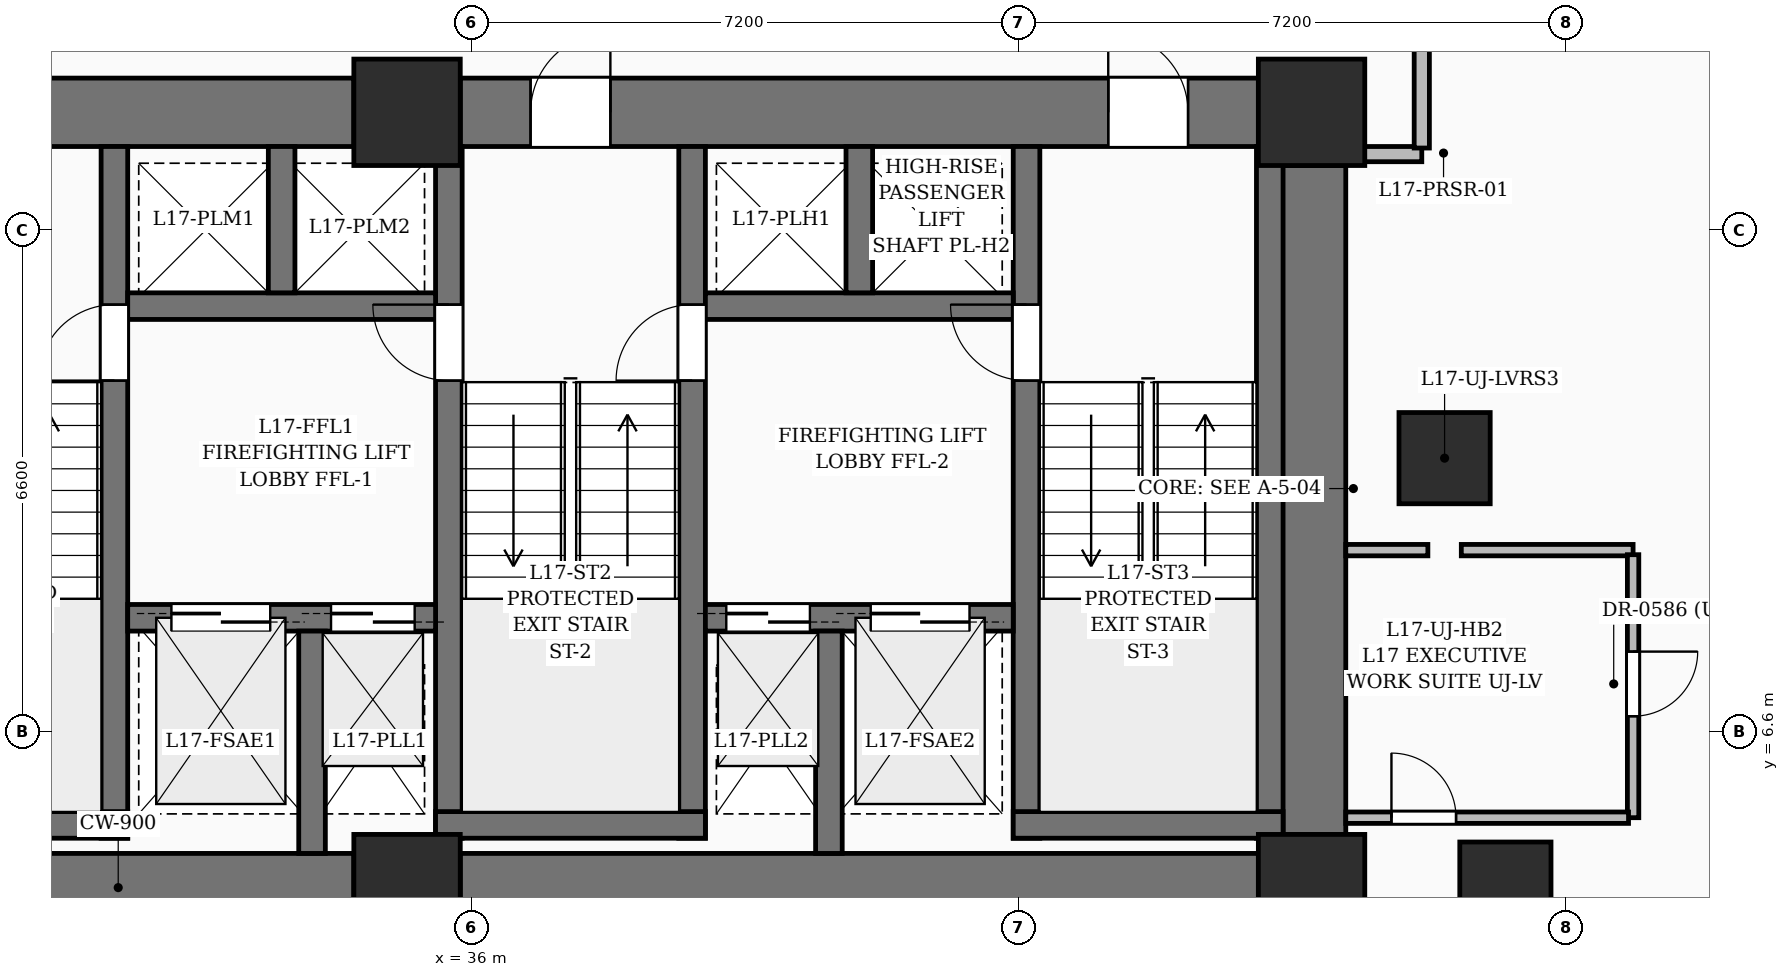
"""IFC4 building model, lengths in metres.
Left out: names, types, materials, properties, quantities, classifications, styles, units other than length and angle.
Written with IfcOpenShell. Run it as: python <this file> out.ifc"""

import sys

from ifc_helpers import new_model, si_unit, direction, frame, frame_2d, origin, origin_2d, place, context, subcontext, project, spatial, rectangle, extrude, element, fill, save


model = new_model("IFC4")
c1 = context("Model", 3, precision=1e-05, world=origin(), true_north=direction((0.0, 1.0)))
c2 = subcontext(c1, "Body", "Model", "MODEL_VIEW")
j1 = project(units=[si_unit("LENGTHUNIT", "METRE"), si_unit("PLANEANGLEUNIT", "RADIAN")], contexts=[c1])
p1 = place(None, origin())
s1 = spatial("IfcSite", under=j1, at=p1, CompositionType="ELEMENT")
p2 = place(p1, origin())
s2 = spatial("IfcBuilding", under=s1, at=p2, CompositionType="ELEMENT")
p3 = place(p2, frame((0.0, 0.0, 71.4)))
s3 = spatial("IfcBuildingStorey", under=s2, at=p3, CompositionType="ELEMENT", Elevation=71.4)
for number, where, z_axis, x_axis in (
    (1, (35.15, 4.55, 0.0), (0.0, 0.0, 1.0), (1.0, 0.0, 0.0)),
    (2, (47.05, 4.55, 0.0), (0.0, 0.0, 1.0), (1.0, 0.0, 0.0)),
    (3, (35.15, 14.75, 0.0), (0.0, 0.0, 1.0), (1.0, 0.0, 0.0)),
    (4, (47.05, 14.75, 0.0), (0.0, 0.0, 1.0), (1.0, 0.0, 0.0)),
):
    element("IfcColumn", number, at=place(p3, frame(where, z_axis=z_axis, x_axis=x_axis)), inside=s3, PredefinedType="COLUMN", context=c2, shape_type="SweptSolid", body=[
        extrude(rectangle(XDim=1.4, YDim=1.4, at=origin_2d()), origin(), (0.0, 0.0, 1.0), 3.6),
    ])
for number, where, z_axis, x_axis in (
    (5, (49.6, 4.55, 0.0), (0.0, 0.0, 1.0), (1.0, 0.0, 0.0)),
    (6, (48.8, 10.2, 0.0), (0.0, 0.0, 1.0), (1.0, 0.0, 0.0)),
):
    element("IfcColumn", number, at=place(p3, frame(where, z_axis=z_axis, x_axis=x_axis)), inside=s3, PredefinedType="COLUMN", context=c2, shape_type="SweptSolid", body=[
        extrude(rectangle(XDim=1.2, YDim=1.2, at=origin_2d()), origin(), (0.0, 0.0, 1.0), 3.6),
    ])
p4 = place(p3, frame((28.25, 4.55, 0.0), z_axis=(0.0, 0.0, 1.0), x_axis=(1.0, 0.0, 0.0)))
e7 = element("IfcWall", 7, at=p4, inside=s3, PredefinedType="SHEAR", context=c2, shape_type="SweptSolid", body=[
    extrude(rectangle(XDim=6.2, YDim=0.9, at=frame_2d((3.1, 0.0))), origin(), (0.0, 0.0, 1.0), 3.6),
])
p5 = place(p3, frame((35.85, 4.55, 0.0), z_axis=(0.0, 0.0, 1.0), x_axis=(1.0, 0.0, 0.0)))
e8 = element("IfcWall", 8, at=p5, inside=s3, PredefinedType="SHEAR", context=c2, shape_type="SweptSolid", body=[
    extrude(rectangle(XDim=10.5, YDim=0.9, at=frame_2d((5.25, 0.0))), origin(), (0.0, 0.0, 1.0), 3.6),
])
p6 = place(p3, frame((28.25, 14.75, 0.0), z_axis=(0.0, 0.0, 1.0), x_axis=(1.0, 0.0, 0.0)))
e9 = element("IfcWall", 9, at=p6, inside=s3, PredefinedType="SHEAR", context=c2, shape_type="SweptSolid", body=[
    extrude(rectangle(XDim=6.2, YDim=0.9, at=frame_2d((3.1, 0.0))), origin(), (0.0, 0.0, 1.0), 3.6),
])
p7 = place(p6, frame((0.925, 0.0, 0.0)))
e10 = element("IfcOpeningElement", 10, at=p7, cuts=e9, PredefinedType="OPENING", context=c2, shape_type="SweptSolid", body=[
    extrude(rectangle(XDim=1.05, YDim=2.15, at=frame_2d((0.525, 1.075))), frame((0.0, 0.46, 0.0), z_axis=(0.0, -1.0, 0.0), x_axis=(1.0, 0.0, 0.0)), (0.0, 0.0, 1.0), 0.92),
])
p8 = place(p3, frame((35.85, 14.75, 0.0), z_axis=(0.0, 0.0, 1.0), x_axis=(1.0, 0.0, 0.0)))
e11 = element("IfcWall", 11, at=p8, inside=s3, PredefinedType="SHEAR", context=c2, shape_type="SweptSolid", body=[
    extrude(rectangle(XDim=10.5, YDim=0.9, at=frame_2d((5.25, 0.0))), origin(), (0.0, 0.0, 1.0), 3.6),
])
p9 = place(p8, frame((0.925, 0.0, 0.0)))
e12 = element("IfcOpeningElement", 12, at=p9, cuts=e11, PredefinedType="OPENING", context=c2, shape_type="SweptSolid", body=[
    extrude(rectangle(XDim=1.05, YDim=2.15, at=frame_2d((0.525, 1.075))), frame((0.0, 0.46, 0.0), z_axis=(0.0, -1.0, 0.0), x_axis=(1.0, 0.0, 0.0)), (0.0, 0.0, 1.0), 0.92),
])
p10 = place(p8, frame((8.525, 0.0, 0.0)))
e13 = element("IfcOpeningElement", 13, at=p10, cuts=e11, PredefinedType="OPENING", context=c2, shape_type="SweptSolid", body=[
    extrude(rectangle(XDim=1.05, YDim=2.15, at=frame_2d((0.525, 1.075))), frame((0.0, 0.46, 0.0), z_axis=(0.0, -1.0, 0.0), x_axis=(1.0, 0.0, 0.0)), (0.0, 0.0, 1.0), 0.92),
])
p11 = place(p3, frame((47.05, 5.25, 0.0), z_axis=(0.0, 0.0, 1.0), x_axis=(0.0, 1.0, 0.0)))
e14 = element("IfcWall", 14, at=p11, inside=s3, PredefinedType="SHEAR", context=c2, shape_type="SweptSolid", body=[
    extrude(rectangle(XDim=8.8, YDim=0.9, at=frame_2d((4.4, 0.0))), origin(), (0.0, 0.0, 1.0), 3.6),
])
p12 = place(p3, frame((31.3, 5.2, 0.0), z_axis=(0.0, 0.0, 1.0), x_axis=(0.0, 1.0, 0.0)))
e15 = element("IfcWall", 15, at=p12, inside=s3, PredefinedType="SOLIDWALL", context=c2, shape_type="SweptSolid", body=[
    extrude(rectangle(XDim=9.1, YDim=0.35, at=frame_2d((4.55, 0.0))), origin(), (0.0, 0.0, 1.0), 3.6),
])
p13 = place(p12, frame((6.02, 0.0, 0.0)))
e16 = element("IfcOpeningElement", 16, at=p13, cuts=e15, PredefinedType="OPENING", context=c2, shape_type="SweptSolid", body=[
    extrude(rectangle(XDim=1.0, YDim=2.15, at=frame_2d((0.5, 1.075))), frame((0.0, 0.185, 0.0), z_axis=(0.0, -1.0, 0.0), x_axis=(1.0, 0.0, 0.0)), (0.0, 0.0, 1.0), 0.37),
])
p14 = place(p3, frame((27.925, 5.375, 0.0), z_axis=(0.0, 0.0, 1.0), x_axis=(1.0, 0.0, 0.0)))
e17 = element("IfcWall", 17, at=p14, inside=s3, PredefinedType="SOLIDWALL", context=c2, shape_type="SweptSolid", body=[
    extrude(rectangle(XDim=3.55, YDim=0.35, at=frame_2d((1.775, 0.0))), origin(), (0.0, 0.0, 1.0), 3.6),
])
p15 = place(p3, frame((35.7, 5.2, 0.0), z_axis=(0.0, 0.0, 1.0), x_axis=(0.0, 1.0, 0.0)))
e18 = element("IfcWall", 18, at=p15, inside=s3, PredefinedType="SOLIDWALL", context=c2, shape_type="SweptSolid", body=[
    extrude(rectangle(XDim=9.1, YDim=0.35, at=frame_2d((4.55, 0.0))), origin(), (0.0, 0.0, 1.0), 3.6),
])
p16 = place(p15, frame((6.02, 0.0, 0.0)))
e19 = element("IfcOpeningElement", 19, at=p16, cuts=e18, PredefinedType="OPENING", context=c2, shape_type="SweptSolid", body=[
    extrude(rectangle(XDim=1.0, YDim=2.15, at=frame_2d((0.5, 1.075))), frame((0.0, 0.185, 0.0), z_axis=(0.0, -1.0, 0.0), x_axis=(1.0, 0.0, 0.0)), (0.0, 0.0, 1.0), 0.37),
])
p17 = place(p3, frame((38.9, 5.2, 0.0), z_axis=(0.0, 0.0, 1.0), x_axis=(0.0, 1.0, 0.0)))
e20 = element("IfcWall", 20, at=p17, inside=s3, PredefinedType="SOLIDWALL", context=c2, shape_type="SweptSolid", body=[
    extrude(rectangle(XDim=9.1, YDim=0.35, at=frame_2d((4.55, 0.0))), origin(), (0.0, 0.0, 1.0), 3.6),
])
p18 = place(p17, frame((6.02, 0.0, 0.0)))
e21 = element("IfcOpeningElement", 21, at=p18, cuts=e20, PredefinedType="OPENING", context=c2, shape_type="SweptSolid", body=[
    extrude(rectangle(XDim=1.0, YDim=2.15, at=frame_2d((0.5, 1.075))), frame((0.0, 0.185, 0.0), z_axis=(0.0, -1.0, 0.0), x_axis=(1.0, 0.0, 0.0)), (0.0, 0.0, 1.0), 0.37),
])
p19 = place(p3, frame((35.525, 5.375, 0.0), z_axis=(0.0, 0.0, 1.0), x_axis=(1.0, 0.0, 0.0)))
e22 = element("IfcWall", 22, at=p19, inside=s3, PredefinedType="SOLIDWALL", context=c2, shape_type="SweptSolid", body=[
    extrude(rectangle(XDim=3.55, YDim=0.35, at=frame_2d((1.775, 0.0))), origin(), (0.0, 0.0, 1.0), 3.6),
])
p20 = place(p3, frame((43.3, 5.2, 0.0), z_axis=(0.0, 0.0, 1.0), x_axis=(0.0, 1.0, 0.0)))
e23 = element("IfcWall", 23, at=p20, inside=s3, PredefinedType="SOLIDWALL", context=c2, shape_type="SweptSolid", body=[
    extrude(rectangle(XDim=9.1, YDim=0.35, at=frame_2d((4.55, 0.0))), origin(), (0.0, 0.0, 1.0), 3.6),
])
p21 = place(p20, frame((6.02, 0.0, 0.0)))
e24 = element("IfcOpeningElement", 24, at=p21, cuts=e23, PredefinedType="OPENING", context=c2, shape_type="SweptSolid", body=[
    extrude(rectangle(XDim=1.0, YDim=2.15, at=frame_2d((0.5, 1.075))), frame((0.0, 0.185, 0.0), z_axis=(0.0, -1.0, 0.0), x_axis=(1.0, 0.0, 0.0)), (0.0, 0.0, 1.0), 0.37),
])
p22 = place(p3, frame((46.5, 5.2, 0.0), z_axis=(0.0, 0.0, 1.0), x_axis=(0.0, 1.0, 0.0)))
e25 = element("IfcWall", 25, at=p22, inside=s3, PredefinedType="SOLIDWALL", context=c2, shape_type="SweptSolid", body=[
    extrude(rectangle(XDim=9.1, YDim=0.35, at=frame_2d((4.55, 0.0))), origin(), (0.0, 0.0, 1.0), 3.6),
])
p23 = place(p3, frame((43.125, 5.375, 0.0), z_axis=(0.0, 0.0, 1.0), x_axis=(1.0, 0.0, 0.0)))
e26 = element("IfcWall", 26, at=p23, inside=s3, PredefinedType="SOLIDWALL", context=c2, shape_type="SweptSolid", body=[
    extrude(rectangle(XDim=3.55, YDim=0.35, at=frame_2d((1.775, 0.0))), origin(), (0.0, 0.0, 1.0), 3.6),
])
p24 = place(p3, frame((31.475, 8.1, 0.0), z_axis=(0.0, 0.0, 1.0), x_axis=(1.0, 0.0, 0.0)))
e27 = element("IfcWall", 27, at=p24, inside=s3, PredefinedType="SOLIDWALL", context=c2, shape_type="SweptSolid", body=[
    extrude(rectangle(XDim=4.05, YDim=0.35, at=frame_2d((2.025, 0.0))), origin(), (0.0, 0.0, 1.0), 3.6),
])
p25 = place(p24, frame((0.575, 0.0, 0.0)))
e28 = element("IfcOpeningElement", 28, at=p25, cuts=e27, PredefinedType="OPENING", context=c2, shape_type="SweptSolid", body=[
    extrude(rectangle(XDim=1.3, YDim=2.25, at=frame_2d((0.65, 1.125))), frame((0.0, 0.185, 0.0), z_axis=(0.0, -1.0, 0.0), x_axis=(1.0, 0.0, 0.0)), (0.0, 0.0, 1.0), 0.37),
])
p26 = place(p24, frame((2.675, 0.0, 0.0)))
e29 = element("IfcOpeningElement", 29, at=p26, cuts=e27, PredefinedType="OPENING", context=c2, shape_type="SweptSolid", body=[
    extrude(rectangle(XDim=1.1, YDim=2.2, at=frame_2d((0.55, 1.1))), frame((0.0, 0.185, 0.0), z_axis=(0.0, -1.0, 0.0), x_axis=(1.0, 0.0, 0.0)), (0.0, 0.0, 1.0), 0.37),
])
p27 = place(p3, frame((39.075, 8.1, 0.0), z_axis=(0.0, 0.0, 1.0), x_axis=(1.0, 0.0, 0.0)))
e30 = element("IfcWall", 30, at=p27, inside=s3, PredefinedType="SOLIDWALL", context=c2, shape_type="SweptSolid", body=[
    extrude(rectangle(XDim=4.05, YDim=0.35, at=frame_2d((2.025, 0.0))), origin(), (0.0, 0.0, 1.0), 3.6),
])
p28 = place(p27, frame((2.175, 0.0, 0.0)))
e31 = element("IfcOpeningElement", 31, at=p28, cuts=e30, PredefinedType="OPENING", context=c2, shape_type="SweptSolid", body=[
    extrude(rectangle(XDim=1.3, YDim=2.25, at=frame_2d((0.65, 1.125))), frame((0.0, 0.185, 0.0), z_axis=(0.0, -1.0, 0.0), x_axis=(1.0, 0.0, 0.0)), (0.0, 0.0, 1.0), 0.37),
])
p29 = place(p27, frame((0.275, 0.0, 0.0)))
e32 = element("IfcOpeningElement", 32, at=p29, cuts=e30, PredefinedType="OPENING", context=c2, shape_type="SweptSolid", body=[
    extrude(rectangle(XDim=1.1, YDim=2.2, at=frame_2d((0.55, 1.1))), frame((0.0, 0.185, 0.0), z_axis=(0.0, -1.0, 0.0), x_axis=(1.0, 0.0, 0.0)), (0.0, 0.0, 1.0), 0.37),
])
for number, where, z_axis, x_axis in (
    (33, (33.9, 5.0, 0.0), (0.0, 0.0, 1.0), (0.0, 1.0, 0.0)),
    (34, (40.7, 5.0, 0.0), (0.0, 0.0, 1.0), (0.0, 1.0, 0.0)),
):
    element("IfcWall", number, at=place(p3, frame(where, z_axis=z_axis, x_axis=x_axis)), inside=s3, PredefinedType="SOLIDWALL", context=c2, shape_type="SweptSolid", body=[
        extrude(rectangle(XDim=2.925, YDim=0.35, at=frame_2d((1.462, 0.0))), origin(), (0.0, 0.0, 1.0), 3.6),
    ])
p30 = place(p3, frame((31.475, 12.2, 0.0), z_axis=(0.0, 0.0, 1.0), x_axis=(1.0, 0.0, 0.0)))
e35 = element("IfcWall", 35, at=p30, inside=s3, PredefinedType="SOLIDWALL", context=c2, shape_type="SweptSolid", body=[
    extrude(rectangle(XDim=4.05, YDim=0.35, at=frame_2d((2.025, 0.0))), origin(), (0.0, 0.0, 1.0), 3.6),
])
p31 = place(p3, frame((33.5, 12.375, 0.0), z_axis=(0.0, 0.0, 1.0), x_axis=(0.0, 1.0, 0.0)))
e36 = element("IfcWall", 36, at=p31, inside=s3, PredefinedType="SOLIDWALL", context=c2, shape_type="SweptSolid", body=[
    extrude(rectangle(XDim=1.925, YDim=0.35, at=frame_2d((0.962, 0.0))), origin(), (0.0, 0.0, 1.0), 3.6),
])
p32 = place(p3, frame((39.075, 12.2, 0.0), z_axis=(0.0, 0.0, 1.0), x_axis=(1.0, 0.0, 0.0)))
e37 = element("IfcWall", 37, at=p32, inside=s3, PredefinedType="SOLIDWALL", context=c2, shape_type="SweptSolid", body=[
    extrude(rectangle(XDim=4.05, YDim=0.35, at=frame_2d((2.025, 0.0))), origin(), (0.0, 0.0, 1.0), 3.6),
])
p33 = place(p3, frame((41.1, 12.375, 0.0), z_axis=(0.0, 0.0, 1.0), x_axis=(0.0, 1.0, 0.0)))
e38 = element("IfcWall", 38, at=p33, inside=s3, PredefinedType="SOLIDWALL", context=c2, shape_type="SweptSolid", body=[
    extrude(rectangle(XDim=1.925, YDim=0.35, at=frame_2d((0.962, 0.0))), origin(), (0.0, 0.0, 1.0), 3.6),
])
p34 = place(p3, frame((47.5, 14.2, 0.0), z_axis=(0.0, 0.0, 1.0), x_axis=(1.0, 0.0, 0.0)))
e39 = element("IfcWall", 39, at=p34, inside=s3, PredefinedType="PARTITIONING", context=c2, shape_type="SweptSolid", body=[
    extrude(rectangle(XDim=1.0, YDim=0.2, at=frame_2d((0.5, 0.0))), origin(), (0.0, 0.0, 1.0), 3.35),
])
p35 = place(p3, frame((47.5, 8.99, 0.0), z_axis=(0.0, 0.0, 1.0), x_axis=(1.0, 0.0, 0.0)))
e40 = element("IfcWall", 40, at=p35, inside=s3, PredefinedType="PARTITIONING", context=c2, shape_type="SweptSolid", body=[
    extrude(rectangle(XDim=1.08, YDim=0.15, at=frame_2d((0.54, 0.0))), origin(), (0.0, 0.0, 1.0), 2.309),
])
p36 = place(p3, frame((49.02, 8.99, 0.0), z_axis=(0.0, 0.0, 1.0), x_axis=(1.0, 0.0, 0.0)))
e41 = element("IfcWall", 41, at=p36, inside=s3, PredefinedType="PARTITIONING", context=c2, shape_type="SweptSolid", body=[
    extrude(rectangle(XDim=2.26, YDim=0.15, at=frame_2d((1.13, 0.0))), origin(), (0.0, 0.0, 1.0), 3.35),
])
p37 = place(p3, frame((51.28, 8.93, 0.0), z_axis=(0.0, 0.0, 1.0), x_axis=(0.0, -1.0, 0.0)))
e42 = element("IfcWall", 42, at=p37, inside=s3, PredefinedType="PARTITIONING", context=c2, shape_type="SweptSolid", body=[
    extrude(rectangle(XDim=3.46, YDim=0.15, at=frame_2d((1.73, 0.0))), origin(), (0.0, 0.0, 1.0), 3.35),
])
p38 = place(p37, frame((1.275, 0.0, 0.0)))
e43 = element("IfcOpeningElement", 43, at=p38, cuts=e42, PredefinedType="OPENING", context=c2, shape_type="SweptSolid", body=[
    extrude(rectangle(XDim=0.85, YDim=2.1, at=frame_2d((0.425, 1.05))), frame((0.0, 0.085, 0.0), z_axis=(0.0, -1.0, 0.0), x_axis=(1.0, 0.0, 0.0)), (0.0, 0.0, 1.0), 0.17),
])
p39 = place(p3, frame((47.5, 5.47, 0.0), z_axis=(0.0, 0.0, 1.0), x_axis=(1.0, 0.0, 0.0)))
e44 = element("IfcWall", 44, at=p39, inside=s3, PredefinedType="PARTITIONING", context=c2, shape_type="SweptSolid", body=[
    extrude(rectangle(XDim=3.72, YDim=0.15, at=frame_2d((1.86, 0.0))), origin(), (0.0, 0.0, 1.0), 2.309),
])
p40 = place(p39, frame((0.601, 0.0, 0.0)))
e45 = element("IfcOpeningElement", 45, at=p40, cuts=e44, PredefinedType="OPENING", context=c2, shape_type="SweptSolid", body=[
    extrude(rectangle(XDim=0.85, YDim=2.1, at=frame_2d((0.425, 1.05))), frame((0.0, 0.085, 0.0), z_axis=(0.0, -1.0, 0.0), x_axis=(1.0, 0.0, 0.0)), (0.0, 0.0, 1.0), 0.17),
])
p41 = place(p3, frame((48.5, 14.28, 0.0), z_axis=(0.0, 0.0, 1.0), x_axis=(0.0, 1.0, 0.0)))
e46 = element("IfcWall", 46, at=p41, inside=s3, PredefinedType="PARTITIONING", context=c2, shape_type="SweptSolid", body=[
    extrude(rectangle(XDim=3.39, YDim=0.2, at=frame_2d((1.695, 0.0))), origin(), (0.0, 0.0, 1.0), 1.12),
])
p42 = place(p9, origin())
e47 = element("IfcDoor", 47, at=p42, inside=s3, OperationType="SINGLE_SWING_RIGHT", PredefinedType="DOOR", context=c2, shape_type="SweptSolid", body=[
    extrude(rectangle(XDim=1.05, YDim=2.15, at=frame_2d((0.525, 1.075))), frame((0.0, 0.025, 0.0), z_axis=(0.0, -1.0, 0.0), x_axis=(1.0, 0.0, 0.0)), (0.0, 0.0, 1.0), 0.05),
])
fill(e12, e47)
p43 = place(p10, origin())
e48 = element("IfcDoor", 48, at=p43, inside=s3, OperationType="SINGLE_SWING_LEFT", PredefinedType="DOOR", context=c2, shape_type="SweptSolid", body=[
    extrude(rectangle(XDim=1.05, YDim=2.15, at=frame_2d((0.525, 1.075))), frame((0.0, 0.025, 0.0), z_axis=(0.0, -1.0, 0.0), x_axis=(1.0, 0.0, 0.0)), (0.0, 0.0, 1.0), 0.05),
])
fill(e13, e48)
p44 = place(p13, origin())
e49 = element("IfcDoor", 49, at=p44, inside=s3, OperationType="SINGLE_SWING_LEFT", PredefinedType="DOOR", context=c2, shape_type="SweptSolid", body=[
    extrude(rectangle(XDim=1.0, YDim=2.15, at=frame_2d((0.5, 1.075))), frame((0.0, 0.025, 0.0), z_axis=(0.0, -1.0, 0.0), x_axis=(1.0, 0.0, 0.0)), (0.0, 0.0, 1.0), 0.05),
])
fill(e16, e49)
p45 = place(p16, origin())
e50 = element("IfcDoor", 50, at=p45, inside=s3, OperationType="SINGLE_SWING_RIGHT", PredefinedType="DOOR", context=c2, shape_type="SweptSolid", body=[
    extrude(rectangle(XDim=1.0, YDim=2.15, at=frame_2d((0.5, 1.075))), frame((0.0, 0.025, 0.0), z_axis=(0.0, -1.0, 0.0), x_axis=(1.0, 0.0, 0.0)), (0.0, 0.0, 1.0), 0.05),
])
fill(e19, e50)
p46 = place(p18, origin())
e51 = element("IfcDoor", 51, at=p46, inside=s3, OperationType="SINGLE_SWING_LEFT", PredefinedType="DOOR", context=c2, shape_type="SweptSolid", body=[
    extrude(rectangle(XDim=1.0, YDim=2.15, at=frame_2d((0.5, 1.075))), frame((0.0, 0.025, 0.0), z_axis=(0.0, -1.0, 0.0), x_axis=(1.0, 0.0, 0.0)), (0.0, 0.0, 1.0), 0.05),
])
fill(e21, e51)
p47 = place(p21, origin())
e52 = element("IfcDoor", 52, at=p47, inside=s3, OperationType="SINGLE_SWING_RIGHT", PredefinedType="DOOR", context=c2, shape_type="SweptSolid", body=[
    extrude(rectangle(XDim=1.0, YDim=2.15, at=frame_2d((0.5, 1.075))), frame((0.0, 0.025, 0.0), z_axis=(0.0, -1.0, 0.0), x_axis=(1.0, 0.0, 0.0)), (0.0, 0.0, 1.0), 0.05),
])
fill(e24, e52)
p48 = place(p25, origin())
e53 = element("IfcDoor", 53, at=p48, inside=s3, OperationType="DOUBLE_DOOR_SLIDING", PredefinedType="DOOR", context=c2, shape_type="SweptSolid", body=[
    extrude(rectangle(XDim=1.3, YDim=2.25, at=frame_2d((0.65, 1.125))), frame((0.0, 0.025, 0.0), z_axis=(0.0, -1.0, 0.0), x_axis=(1.0, 0.0, 0.0)), (0.0, 0.0, 1.0), 0.05),
])
fill(e28, e53)
p49 = place(p28, origin())
e54 = element("IfcDoor", 54, at=p49, inside=s3, OperationType="DOUBLE_DOOR_SLIDING", PredefinedType="DOOR", context=c2, shape_type="SweptSolid", body=[
    extrude(rectangle(XDim=1.3, YDim=2.25, at=frame_2d((0.65, 1.125))), frame((0.0, 0.025, 0.0), z_axis=(0.0, -1.0, 0.0), x_axis=(1.0, 0.0, 0.0)), (0.0, 0.0, 1.0), 0.05),
])
fill(e31, e54)
p50 = place(p26, origin())
e55 = element("IfcDoor", 55, at=p50, inside=s3, OperationType="DOUBLE_DOOR_SLIDING", PredefinedType="DOOR", context=c2, shape_type="SweptSolid", body=[
    extrude(rectangle(XDim=1.1, YDim=2.2, at=frame_2d((0.55, 1.1))), frame((0.0, 0.025, 0.0), z_axis=(0.0, -1.0, 0.0), x_axis=(1.0, 0.0, 0.0)), (0.0, 0.0, 1.0), 0.05),
])
fill(e29, e55)
p51 = place(p29, origin())
e56 = element("IfcDoor", 56, at=p51, inside=s3, OperationType="DOUBLE_DOOR_SLIDING", PredefinedType="DOOR", context=c2, shape_type="SweptSolid", body=[
    extrude(rectangle(XDim=1.1, YDim=2.2, at=frame_2d((0.55, 1.1))), frame((0.0, 0.025, 0.0), z_axis=(0.0, -1.0, 0.0), x_axis=(1.0, 0.0, 0.0)), (0.0, 0.0, 1.0), 0.05),
])
fill(e32, e56)
p52 = place(p38, origin())
e57 = element("IfcDoor", 57, at=p52, inside=s3, OperationType="SINGLE_SWING_LEFT", PredefinedType="DOOR", context=c2, shape_type="SweptSolid", body=[
    extrude(rectangle(XDim=0.85, YDim=2.1, at=frame_2d((0.425, 1.05))), frame((0.0, 0.025, 0.0), z_axis=(0.0, -1.0, 0.0), x_axis=(1.0, 0.0, 0.0)), (0.0, 0.0, 1.0), 0.05),
])
fill(e43, e57)
p53 = place(p40, origin())
e58 = element("IfcDoor", 58, at=p53, inside=s3, OperationType="SINGLE_SWING_LEFT", PredefinedType="DOOR", context=c2, shape_type="SweptSolid", body=[
    extrude(rectangle(XDim=0.85, YDim=2.1, at=frame_2d((0.425, 1.05))), frame((0.0, 0.025, 0.0), z_axis=(0.0, -1.0, 0.0), x_axis=(1.0, 0.0, 0.0)), (0.0, 0.0, 1.0), 0.05),
])
fill(e45, e58)
save(model, sys.argv[1])
